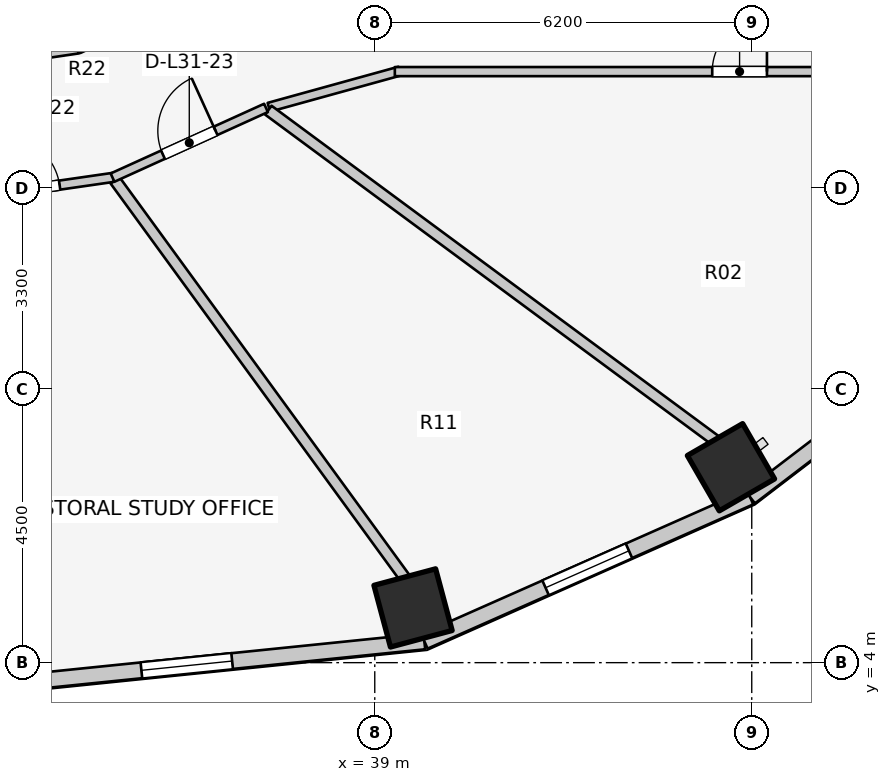
"""IFC4 building model, lengths in metres.
Left out: names, types, materials, properties, quantities, classifications, styles, units other than length and angle.
Written with IfcOpenShell. Run it as: python <this file> out.ifc"""

import sys

from ifc_helpers import new_model, si_unit, direction, frame, frame_2d, origin, origin_2d, place, context, subcontext, project, spatial, rectangle, extrude, element, fill, save


model = new_model("IFC4")
c1 = context("Model", 3, precision=1e-05, world=origin(), true_north=direction((0.0, 1.0)))
c2 = subcontext(c1, "Body", "Model", "MODEL_VIEW")
j1 = project(units=[si_unit("LENGTHUNIT", "METRE"), si_unit("PLANEANGLEUNIT", "RADIAN")], contexts=[c1])
p1 = place(None, origin())
s1 = spatial("IfcSite", under=j1, at=p1, CompositionType="ELEMENT")
p2 = place(p1, origin())
s2 = spatial("IfcBuilding", under=s1, at=p2, CompositionType="ELEMENT")
p3 = place(p2, frame((0.0, 0.0, 104.2)))
s3 = spatial("IfcBuildingStorey", under=s2, at=p3, CompositionType="ELEMENT", Elevation=104.2)
for number, where, z_axis, x_axis in (
    (1, (39.629, 4.9, 0.0), (0.0, 0.0, 1.0), (0.259, -0.966, 0.0)),
    (2, (44.858, 7.214, 0.0), (0.0, 0.0, 1.0), (0.5, -0.866, 0.0)),
):
    element("IfcColumn", number, at=place(p3, frame(where, z_axis=z_axis, x_axis=x_axis)), inside=s3, PredefinedType="COLUMN", context=c2, shape_type="SweptSolid", body=[
        extrude(rectangle(XDim=1.05, YDim=1.05, at=origin_2d()), origin(), (0.0, 0.0, 1.0), 3.1),
    ])
p4 = place(p3, frame((32.0, 3.551, 0.0), z_axis=(0.0, 0.0, 1.0), x_axis=(0.994821390558, 0.101638579726, 0.0)))
e3 = element("IfcWall", 3, at=p4, inside=s3, PredefinedType="STANDARD", context=c2, shape_type="SweptSolid", body=[
    extrude(rectangle(XDim=7.857, YDim=0.26, at=frame_2d((3.929, 0.0))), origin(), (0.0, 0.0, 1.0), 2.85),
])
p5 = place(p4, frame((3.178, 0.0, 0.75)))
e4 = element("IfcOpeningElement", 4, at=p5, cuts=e3, PredefinedType="OPENING", context=c2, shape_type="SweptSolid", body=[
    extrude(rectangle(XDim=1.5, YDim=1.6, at=frame_2d((0.75, 0.8))), frame((0.0, 0.14, 0.0), z_axis=(0.0, -1.0, 0.0), x_axis=(1.0, 0.0, 0.0)), (0.0, 0.0, 1.0), 0.28),
])
p6 = place(p3, frame((39.816, 4.349, 0.0), z_axis=(0.0, 0.0, 1.0), x_axis=(0.914336605747, 0.404955023911, 0.0)))
e5 = element("IfcWall", 5, at=p6, inside=s3, PredefinedType="STANDARD", context=c2, shape_type="SweptSolid", body=[
    extrude(rectangle(XDim=5.859, YDim=0.26, at=frame_2d((2.929, 0.0))), origin(), (0.0, 0.0, 1.0), 2.85),
])
p7 = place(p6, frame((2.179, 0.0, 0.75)))
e6 = element("IfcOpeningElement", 6, at=p7, cuts=e5, PredefinedType="OPENING", context=c2, shape_type="SweptSolid", body=[
    extrude(rectangle(XDim=1.5, YDim=1.6, at=frame_2d((0.75, 0.8))), frame((0.0, 0.14, 0.0), z_axis=(0.0, -1.0, 0.0), x_axis=(1.0, 0.0, 0.0)), (0.0, 0.0, 1.0), 0.28),
])
p8 = place(p3, frame((45.173, 6.722, 0.0), z_axis=(0.0, 0.0, 1.0), x_axis=(0.794809810864, 0.606858603427, 0.0)))
e7 = element("IfcWall", 7, at=p8, inside=s3, PredefinedType="STANDARD", context=c2, shape_type="SweptSolid", body=[
    extrude(rectangle(XDim=5.149, YDim=0.26, at=frame_2d((2.575, 0.0))), origin(), (0.0, 0.0, 1.0), 2.85),
])
p9 = place(p3, frame((32.0, 13.78, 0.0), z_axis=(0.0, 0.0, 1.0), x_axis=(0.989268584896, 0.146108408166, 0.0)))
e8 = element("IfcWall", 8, at=p9, inside=s3, PredefinedType="PARTITIONING", context=c2, shape_type="SweptSolid", body=[
    extrude(rectangle(XDim=2.151, YDim=0.15, at=frame_2d((1.075, 0.0))), origin(), (0.0, 0.0, 1.0), 2.272),
])
p10 = place(p3, frame((34.127, 14.094, 0.0), z_axis=(0.0, 0.0, 1.0), x_axis=(0.906943449489, 0.421252393975, 0.0)))
e9 = element("IfcWall", 9, at=p10, inside=s3, PredefinedType="PARTITIONING", context=c2, shape_type="SweptSolid", body=[
    extrude(rectangle(XDim=2.186, YDim=0.15, at=frame_2d((1.093, 0.0))), origin(), (0.0, 0.0, 1.0), 2.272),
])
p11 = place(p3, frame((37.258, 13.133, 0.0), z_axis=(0.0, 0.0, 1.0), x_axis=(0.963833843713, 0.266503886865, 0.0)))
e10 = element("IfcWall", 10, at=p11, inside=s3, PredefinedType="PARTITIONING", context=c2, shape_type="SweptSolid", body=[
    extrude(rectangle(XDim=2.232, YDim=0.15, at=frame_2d((1.116, 0.0))), origin(), (0.0, 0.0, 1.0), 2.272),
])
p12 = place(p3, frame((39.33, 13.72, 0.0), z_axis=(0.0, 0.0, 1.0), x_axis=(1.0, 0.0, 0.0)))
e11 = element("IfcWall", 11, at=p12, inside=s3, PredefinedType="PARTITIONING", context=c2, shape_type="SweptSolid", body=[
    extrude(rectangle(XDim=7.52, YDim=0.15, at=frame_2d((3.76, 0.0))), origin(), (0.0, 0.0, 1.0), 2.272),
])
p13 = place(p12, frame((5.22, 0.0, 0.0)))
e12 = element("IfcOpeningElement", 12, at=p13, cuts=e11, PredefinedType="OPENING", context=c2, shape_type="SweptSolid", body=[
    extrude(rectangle(XDim=0.9, YDim=2.1, at=frame_2d((0.45, 1.05))), frame((0.0, 0.085, 0.0), z_axis=(0.0, -1.0, 0.0), x_axis=(1.0, 0.0, 0.0)), (0.0, 0.0, 1.0), 0.17),
])
p14 = place(p3, frame((34.727, 11.934, 0.0), z_axis=(0.0, 0.0, 1.0), x_axis=(0.589042211476, -0.808102266486, 0.0)))
e13 = element("IfcWall", 13, at=p14, inside=s3, PredefinedType="PARTITIONING", context=c2, shape_type="SweptSolid", body=[
    extrude(rectangle(XDim=8.101, YDim=0.18, at=frame_2d((4.051, 0.0))), origin(), (0.0, 0.0, 1.0), 2.272),
])
p15 = place(p3, frame((37.249, 13.086, 0.0), z_axis=(0.0, 0.0, 1.0), x_axis=(0.80430981394, -0.594210167533, 0.0)))
e14 = element("IfcWall", 14, at=p15, inside=s3, PredefinedType="PARTITIONING", context=c2, shape_type="SweptSolid", body=[
    extrude(rectangle(XDim=9.146, YDim=0.18, at=frame_2d((4.573, 0.0))), origin(), (0.0, 0.0, 1.0), 2.272),
])
p16 = place(p3, frame((31.993, 11.59, 0.0), z_axis=(0.0, 0.0, 1.0), x_axis=(0.989748682384, 0.142819976611, 0.0)))
e15 = element("IfcWall", 15, at=p16, inside=s3, PredefinedType="PARTITIONING", context=c2, shape_type="SweptSolid", body=[
    extrude(rectangle(XDim=2.737, YDim=0.15, at=frame_2d((1.368, 0.0))), origin(), (0.0, 0.0, 1.0), 2.272),
])
p17 = place(p16, frame((0.893, 0.0, 0.0)))
e16 = element("IfcOpeningElement", 16, at=p17, cuts=e15, PredefinedType="OPENING", context=c2, shape_type="SweptSolid", body=[
    extrude(rectangle(XDim=0.95, YDim=2.1, at=frame_2d((0.475, 1.05))), frame((0.0, 0.085, 0.0), z_axis=(0.0, -1.0, 0.0), x_axis=(1.0, 0.0, 0.0)), (0.0, 0.0, 1.0), 0.17),
])
p18 = place(p3, frame((34.687, 11.977, 0.0), z_axis=(0.0, 0.0, 1.0), x_axis=(0.910568469686, 0.41335827319, 0.0)))
e17 = element("IfcWall", 17, at=p18, inside=s3, PredefinedType="PARTITIONING", context=c2, shape_type="SweptSolid", body=[
    extrude(rectangle(XDim=2.772, YDim=0.15, at=frame_2d((1.386, 0.0))), origin(), (0.0, 0.0, 1.0), 2.272),
])
p19 = place(p18, frame((0.911, 0.0, 0.0)))
e18 = element("IfcOpeningElement", 18, at=p19, cuts=e17, PredefinedType="OPENING", context=c2, shape_type="SweptSolid", body=[
    extrude(rectangle(XDim=0.95, YDim=2.1, at=frame_2d((0.475, 1.05))), frame((0.0, 0.085, 0.0), z_axis=(0.0, -1.0, 0.0), x_axis=(1.0, 0.0, 0.0)), (0.0, 0.0, 1.0), 0.17),
])
p20 = place(p5, origin())
e19 = element("IfcWindow", 19, at=p20, inside=s3, PartitioningType="SINGLE_PANEL", PredefinedType="WINDOW", context=c2, shape_type="SweptSolid", body=[
    extrude(rectangle(XDim=1.5, YDim=1.6, at=frame_2d((0.75, 0.8))), frame((0.0, 0.03, 0.0), z_axis=(0.0, -1.0, 0.0), x_axis=(1.0, 0.0, 0.0)), (0.0, 0.0, 1.0), 0.06),
])
fill(e4, e19)
p21 = place(p7, origin())
e20 = element("IfcWindow", 20, at=p21, inside=s3, PartitioningType="SINGLE_PANEL", PredefinedType="WINDOW", context=c2, shape_type="SweptSolid", body=[
    extrude(rectangle(XDim=1.5, YDim=1.6, at=frame_2d((0.75, 0.8))), frame((0.0, 0.03, 0.0), z_axis=(0.0, -1.0, 0.0), x_axis=(1.0, 0.0, 0.0)), (0.0, 0.0, 1.0), 0.06),
])
fill(e6, e20)
p22 = place(p13, origin())
e21 = element("IfcDoor", 21, at=p22, inside=s3, OperationType="SINGLE_SWING_RIGHT", PredefinedType="DOOR", context=c2, shape_type="SweptSolid", body=[
    extrude(rectangle(XDim=0.9, YDim=2.1, at=frame_2d((0.45, 1.05))), frame((0.0, 0.025, 0.0), z_axis=(0.0, -1.0, 0.0), x_axis=(1.0, 0.0, 0.0)), (0.0, 0.0, 1.0), 0.05),
])
fill(e12, e21)
p23 = place(p17, origin())
e22 = element("IfcDoor", 22, at=p23, inside=s3, OperationType="SINGLE_SWING_LEFT", PredefinedType="DOOR", context=c2, shape_type="SweptSolid", body=[
    extrude(rectangle(XDim=0.95, YDim=2.1, at=frame_2d((0.475, 1.05))), frame((0.0, 0.025, 0.0), z_axis=(0.0, -1.0, 0.0), x_axis=(1.0, 0.0, 0.0)), (0.0, 0.0, 1.0), 0.05),
])
fill(e16, e22)
p24 = place(p19, origin())
e23 = element("IfcDoor", 23, at=p24, inside=s3, OperationType="SINGLE_SWING_RIGHT", PredefinedType="DOOR", context=c2, shape_type="SweptSolid", body=[
    extrude(rectangle(XDim=0.95, YDim=2.1, at=frame_2d((0.475, 1.05))), frame((0.0, 0.025, 0.0), z_axis=(0.0, -1.0, 0.0), x_axis=(1.0, 0.0, 0.0)), (0.0, 0.0, 1.0), 0.05),
])
fill(e18, e23)
save(model, sys.argv[1])
